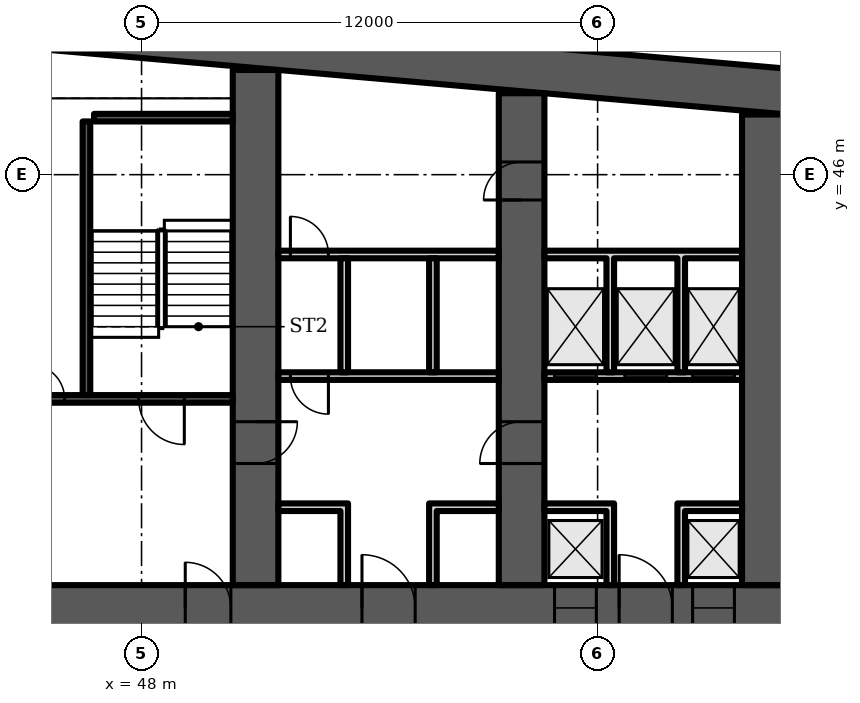
"""IFC4 building model, lengths in metres.
Left out: names, types, materials, properties, quantities, classifications, styles, units other than length and angle.
Written with IfcOpenShell. Run it as: python <this file> out.ifc"""

import sys

from ifc_helpers import new_model, si_unit, direction, frame, frame_2d, origin, place, context, subcontext, project, spatial, polyline, rectangle, outline, extrude, element, fill, save


model = new_model("IFC4")
c1 = context("Model", 3, precision=1e-05, world=origin(), true_north=direction((0.0, 1.0)))
c2 = subcontext(c1, "Body", "Model", "MODEL_VIEW")
j1 = project(units=[si_unit("LENGTHUNIT", "METRE"), si_unit("PLANEANGLEUNIT", "RADIAN")], contexts=[c1])
p1 = place(None, origin())
s1 = spatial("IfcSite", under=j1, at=p1, CompositionType="ELEMENT")
p2 = place(p1, origin())
s2 = spatial("IfcBuilding", under=s1, at=p2, CompositionType="ELEMENT")
p3 = place(p2, frame((0.0, 0.0, 77.5)))
s3 = spatial("IfcBuildingStorey", under=s2, at=p3, CompositionType="ELEMENT", Elevation=77.5)
p4 = place(p3, origin())
e1 = element("IfcWall", 1, at=p4, inside=s3, PredefinedType="SHEAR", context=c2, shape_type="SweptSolid", body=[
    extrude(outline(polyline([(9.0, 47.583), (37.0, 50.032), (65.0, 47.583), (65.0, 48.787), (37.0, 51.237), (9.0, 48.787), (9.0, 47.583)])), origin(), (0.0, 0.0, 1.0), 3.6),
])
p5 = place(p3, frame((9.0, 34.6, 0.0), z_axis=(0.0, 0.0, 1.0), x_axis=(1.0, 0.0, 0.0)))
e2 = element("IfcWall", 2, at=p5, inside=s3, PredefinedType="SHEAR", context=c2, shape_type="SweptSolid", body=[
    extrude(rectangle(XDim=56.0, YDim=1.2, at=frame_2d((28.0, 0.0))), origin(), (0.0, 0.0, 1.0), 3.6),
])
p6 = place(p5, frame((3.3, 0.0, 0.0)))
e3 = element("IfcOpeningElement", 3, at=p6, cuts=e2, PredefinedType="OPENING", context=c2, shape_type="SweptSolid", body=[
    extrude(rectangle(XDim=1.0, YDim=2.1, at=frame_2d((0.5, 1.05))), frame((0.0, 0.61, 0.0), z_axis=(0.0, -1.0, 0.0), x_axis=(1.0, 0.0, 0.0)), (0.0, 0.0, 1.0), 1.22),
])
p7 = place(p5, frame((7.867, 0.0, 0.0)))
e4 = element("IfcOpeningElement", 4, at=p7, cuts=e2, PredefinedType="OPENING", context=c2, shape_type="SweptSolid", body=[
    extrude(rectangle(XDim=1.1, YDim=2.1, at=frame_2d((0.55, 1.05))), frame((0.0, 0.61, 0.0), z_axis=(0.0, -1.0, 0.0), x_axis=(1.0, 0.0, 0.0)), (0.0, 0.0, 1.0), 1.22),
])
p8 = place(p5, frame((12.033, 0.0, 0.0)))
e5 = element("IfcOpeningElement", 5, at=p8, cuts=e2, PredefinedType="OPENING", context=c2, shape_type="SweptSolid", body=[
    extrude(rectangle(XDim=1.1, YDim=2.1, at=frame_2d((0.55, 1.05))), frame((0.0, 0.61, 0.0), z_axis=(0.0, -1.0, 0.0), x_axis=(1.0, 0.0, 0.0)), (0.0, 0.0, 1.0), 1.22),
])
p9 = place(p5, frame((9.8, 0.0, 0.0)))
e6 = element("IfcOpeningElement", 6, at=p9, cuts=e2, PredefinedType="OPENING", context=c2, shape_type="SweptSolid", body=[
    extrude(rectangle(XDim=1.4, YDim=2.1, at=frame_2d((0.7, 1.05))), frame((0.0, 0.61, 0.0), z_axis=(0.0, -1.0, 0.0), x_axis=(1.0, 0.0, 0.0)), (0.0, 0.0, 1.0), 1.22),
])
p10 = place(p5, frame((14.65, 0.0, 0.0)))
e7 = element("IfcOpeningElement", 7, at=p10, cuts=e2, PredefinedType="OPENING", context=c2, shape_type="SweptSolid", body=[
    extrude(rectangle(XDim=1.2, YDim=2.1, at=frame_2d((0.6, 1.05))), frame((0.0, 0.61, 0.0), z_axis=(0.0, -1.0, 0.0), x_axis=(1.0, 0.0, 0.0)), (0.0, 0.0, 1.0), 1.22),
])
p11 = place(p5, frame((21.867, 0.0, 0.0)))
e8 = element("IfcOpeningElement", 8, at=p11, cuts=e2, PredefinedType="OPENING", context=c2, shape_type="SweptSolid", body=[
    extrude(rectangle(XDim=1.1, YDim=2.1, at=frame_2d((0.55, 1.05))), frame((0.0, 0.61, 0.0), z_axis=(0.0, -1.0, 0.0), x_axis=(1.0, 0.0, 0.0)), (0.0, 0.0, 1.0), 1.22),
])
p12 = place(p5, frame((26.033, 0.0, 0.0)))
e9 = element("IfcOpeningElement", 9, at=p12, cuts=e2, PredefinedType="OPENING", context=c2, shape_type="SweptSolid", body=[
    extrude(rectangle(XDim=1.1, YDim=2.1, at=frame_2d((0.55, 1.05))), frame((0.0, 0.61, 0.0), z_axis=(0.0, -1.0, 0.0), x_axis=(1.0, 0.0, 0.0)), (0.0, 0.0, 1.0), 1.22),
])
p13 = place(p5, frame((23.8, 0.0, 0.0)))
e10 = element("IfcOpeningElement", 10, at=p13, cuts=e2, PredefinedType="OPENING", context=c2, shape_type="SweptSolid", body=[
    extrude(rectangle(XDim=1.4, YDim=2.1, at=frame_2d((0.7, 1.05))), frame((0.0, 0.61, 0.0), z_axis=(0.0, -1.0, 0.0), x_axis=(1.0, 0.0, 0.0)), (0.0, 0.0, 1.0), 1.22),
])
p14 = place(p5, frame((28.867, 0.0, 0.0)))
e11 = element("IfcOpeningElement", 11, at=p14, cuts=e2, PredefinedType="OPENING", context=c2, shape_type="SweptSolid", body=[
    extrude(rectangle(XDim=1.1, YDim=2.1, at=frame_2d((0.55, 1.05))), frame((0.0, 0.61, 0.0), z_axis=(0.0, -1.0, 0.0), x_axis=(1.0, 0.0, 0.0)), (0.0, 0.0, 1.0), 1.22),
])
p15 = place(p5, frame((33.033, 0.0, 0.0)))
e12 = element("IfcOpeningElement", 12, at=p15, cuts=e2, PredefinedType="OPENING", context=c2, shape_type="SweptSolid", body=[
    extrude(rectangle(XDim=1.1, YDim=2.1, at=frame_2d((0.55, 1.05))), frame((0.0, 0.61, 0.0), z_axis=(0.0, -1.0, 0.0), x_axis=(1.0, 0.0, 0.0)), (0.0, 0.0, 1.0), 1.22),
])
p16 = place(p5, frame((40.15, 0.0, 0.0)))
e13 = element("IfcOpeningElement", 13, at=p16, cuts=e2, PredefinedType="OPENING", context=c2, shape_type="SweptSolid", body=[
    extrude(rectangle(XDim=1.2, YDim=2.1, at=frame_2d((0.6, 1.05))), frame((0.0, 0.61, 0.0), z_axis=(0.0, -1.0, 0.0), x_axis=(1.0, 0.0, 0.0)), (0.0, 0.0, 1.0), 1.22),
])
p17 = place(p5, frame((44.8, 0.0, 0.0)))
e14 = element("IfcOpeningElement", 14, at=p17, cuts=e2, PredefinedType="OPENING", context=c2, shape_type="SweptSolid", body=[
    extrude(rectangle(XDim=1.4, YDim=2.1, at=frame_2d((0.7, 1.05))), frame((0.0, 0.61, 0.0), z_axis=(0.0, -1.0, 0.0), x_axis=(1.0, 0.0, 0.0)), (0.0, 0.0, 1.0), 1.22),
])
p18 = place(p5, frame((49.867, 0.0, 0.0)))
e15 = element("IfcOpeningElement", 15, at=p18, cuts=e2, PredefinedType="OPENING", context=c2, shape_type="SweptSolid", body=[
    extrude(rectangle(XDim=1.1, YDim=2.1, at=frame_2d((0.55, 1.05))), frame((0.0, 0.61, 0.0), z_axis=(0.0, -1.0, 0.0), x_axis=(1.0, 0.0, 0.0)), (0.0, 0.0, 1.0), 1.22),
])
p19 = place(p5, frame((53.5, 0.0, 0.0)))
e16 = element("IfcOpeningElement", 16, at=p19, cuts=e2, PredefinedType="OPENING", context=c2, shape_type="SweptSolid", body=[
    extrude(rectangle(XDim=1.1, YDim=2.1, at=frame_2d((0.55, 1.05))), frame((0.0, 0.61, 0.0), z_axis=(0.0, -1.0, 0.0), x_axis=(1.0, 0.0, 0.0)), (0.0, 0.0, 1.0), 1.22),
])
p20 = place(p5, frame((51.567, 0.0, 0.0)))
e17 = element("IfcOpeningElement", 17, at=p20, cuts=e2, PredefinedType="OPENING", context=c2, shape_type="SweptSolid", body=[
    extrude(rectangle(XDim=1.4, YDim=2.1, at=frame_2d((0.7, 1.05))), frame((0.0, 0.61, 0.0), z_axis=(0.0, -1.0, 0.0), x_axis=(1.0, 0.0, 0.0)), (0.0, 0.0, 1.0), 1.22),
])
p21 = place(p3, frame((51.0, 35.2, 0.0), z_axis=(0.0, 0.0, 1.0), x_axis=(0.0, 1.0, 0.0)))
e18 = element("IfcWall", 18, at=p21, inside=s3, PredefinedType="SHEAR", context=c2, shape_type="SweptSolid", body=[
    extrude(rectangle(XDim=13.555, YDim=1.2, at=frame_2d((6.778, 0.0))), origin(), (0.0, 0.0, 1.0), 3.6),
])
p22 = place(p21, frame((3.2, 0.0, 0.0)))
e19 = element("IfcOpeningElement", 19, at=p22, cuts=e18, PredefinedType="OPENING", context=c2, shape_type="SweptSolid", body=[
    extrude(rectangle(XDim=1.1, YDim=2.1, at=frame_2d((0.55, 1.05))), frame((0.0, 0.61, 0.0), z_axis=(0.0, -1.0, 0.0), x_axis=(1.0, 0.0, 0.0)), (0.0, 0.0, 1.0), 1.22),
])
p23 = place(p3, frame((58.0, 35.2, 0.0), z_axis=(0.0, 0.0, 1.0), x_axis=(0.0, 1.0, 0.0)))
e20 = element("IfcWall", 20, at=p23, inside=s3, PredefinedType="SHEAR", context=c2, shape_type="SweptSolid", body=[
    extrude(rectangle(XDim=12.943, YDim=1.2, at=frame_2d((6.471, 0.0))), origin(), (0.0, 0.0, 1.0), 3.6),
])
p24 = place(p23, frame((10.134, 0.0, 0.0)))
e21 = element("IfcOpeningElement", 21, at=p24, cuts=e20, PredefinedType="OPENING", context=c2, shape_type="SweptSolid", body=[
    extrude(rectangle(XDim=1.0, YDim=2.1, at=frame_2d((0.5, 1.05))), frame((0.0, 0.61, 0.0), z_axis=(0.0, -1.0, 0.0), x_axis=(1.0, 0.0, 0.0)), (0.0, 0.0, 1.0), 1.22),
])
p25 = place(p23, frame((3.2, 0.0, 0.0)))
e22 = element("IfcOpeningElement", 22, at=p25, cuts=e20, PredefinedType="OPENING", context=c2, shape_type="SweptSolid", body=[
    extrude(rectangle(XDim=1.1, YDim=2.1, at=frame_2d((0.55, 1.05))), frame((0.0, 0.61, 0.0), z_axis=(0.0, -1.0, 0.0), x_axis=(1.0, 0.0, 0.0)), (0.0, 0.0, 1.0), 1.22),
])
p26 = place(p3, frame((64.4, 35.2, 0.0), z_axis=(0.0, 0.0, 1.0), x_axis=(0.0, 1.0, 0.0)))
e23 = element("IfcWall", 23, at=p26, inside=s3, PredefinedType="SHEAR", context=c2, shape_type="SweptSolid", body=[
    extrude(rectangle(XDim=12.383, YDim=1.2, at=frame_2d((6.191, 0.0))), origin(), (0.0, 0.0, 1.0), 3.6),
])
p27 = place(p3, frame((44.6, 40.1, 0.0), z_axis=(0.0, 0.0, 1.0), x_axis=(1.0, 0.0, 0.0)))
e24 = element("IfcWall", 24, at=p27, inside=s3, PredefinedType="SHEAR", context=c2, shape_type="SweptSolid", body=[
    extrude(rectangle(XDim=5.8, YDim=0.2, at=frame_2d((2.9, 0.0))), origin(), (0.0, 0.0, 1.0), 3.2),
])
p28 = place(p27, frame((3.325, 0.0, 0.0)))
e25 = element("IfcOpeningElement", 25, at=p28, cuts=e24, PredefinedType="OPENING", context=c2, shape_type="SweptSolid", body=[
    extrude(rectangle(XDim=1.2, YDim=2.1, at=frame_2d((0.6, 1.05))), frame((0.0, 0.11, 0.0), z_axis=(0.0, -1.0, 0.0), x_axis=(1.0, 0.0, 0.0)), (0.0, 0.0, 1.0), 0.22),
])
p29 = place(p27, frame((0.475, 0.0, 0.0)))
e26 = element("IfcOpeningElement", 26, at=p29, cuts=e24, PredefinedType="OPENING", context=c2, shape_type="SweptSolid", body=[
    extrude(rectangle(XDim=0.9, YDim=2.1, at=frame_2d((0.45, 1.05))), frame((0.0, 0.11, 0.0), z_axis=(0.0, -1.0, 0.0), x_axis=(1.0, 0.0, 0.0)), (0.0, 0.0, 1.0), 0.22),
])
p30 = place(p3, frame((46.55, 40.2, 0.0), z_axis=(0.0, 0.0, 1.0), x_axis=(0.0, 1.0, 0.0)))
e27 = element("IfcWall", 27, at=p30, inside=s3, PredefinedType="SHEAR", context=c2, shape_type="SweptSolid", body=[
    extrude(rectangle(XDim=7.2, YDim=0.2, at=frame_2d((3.6, 0.0))), origin(), (0.0, 0.0, 1.0), 3.2),
])
p31 = place(p3, frame((46.75, 47.5, 0.0), z_axis=(0.0, 0.0, 1.0), x_axis=(1.0, 0.0, 0.0)))
e28 = element("IfcWall", 28, at=p31, inside=s3, PredefinedType="SHEAR", context=c2, shape_type="SweptSolid", body=[
    extrude(rectangle(XDim=3.65, YDim=0.2, at=frame_2d((1.825, 0.0))), origin(), (0.0, 0.0, 1.0), 3.2),
])
p32 = place(p3, frame((51.6, 40.7, 0.0), z_axis=(0.0, 0.0, 1.0), x_axis=(1.0, 0.0, 0.0)))
e29 = element("IfcWall", 29, at=p32, inside=s3, PredefinedType="PARTITIONING", context=c2, shape_type="SweptSolid", body=[
    extrude(rectangle(XDim=5.8, YDim=0.2, at=frame_2d((2.9, 0.0))), origin(), (0.0, 0.0, 1.0), 3.2),
])
p33 = place(p32, frame((0.317, 0.0, 0.0)))
e30 = element("IfcOpeningElement", 30, at=p33, cuts=e29, PredefinedType="OPENING", context=c2, shape_type="SweptSolid", body=[
    extrude(rectangle(XDim=1.0, YDim=2.1, at=frame_2d((0.5, 1.05))), frame((0.0, 0.11, 0.0), z_axis=(0.0, -1.0, 0.0), x_axis=(1.0, 0.0, 0.0)), (0.0, 0.0, 1.0), 0.22),
])
p34 = place(p3, frame((51.6, 43.9, 0.0), z_axis=(0.0, 0.0, 1.0), x_axis=(1.0, 0.0, 0.0)))
e31 = element("IfcWall", 31, at=p34, inside=s3, PredefinedType="PARTITIONING", context=c2, shape_type="SweptSolid", body=[
    extrude(rectangle(XDim=5.8, YDim=0.2, at=frame_2d((2.9, 0.0))), origin(), (0.0, 0.0, 1.0), 3.2),
])
p35 = place(p34, frame((0.317, 0.0, 0.0)))
e32 = element("IfcOpeningElement", 32, at=p35, cuts=e31, PredefinedType="OPENING", context=c2, shape_type="SweptSolid", body=[
    extrude(rectangle(XDim=1.0, YDim=2.1, at=frame_2d((0.5, 1.05))), frame((0.0, 0.11, 0.0), z_axis=(0.0, -1.0, 0.0), x_axis=(1.0, 0.0, 0.0)), (0.0, 0.0, 1.0), 0.22),
])
p36 = place(p3, frame((0.0, 0.0, -0.0)))
e33 = element("IfcWall", 33, at=p36, inside=s3, PredefinedType="PARTITIONING", context=c2, shape_type="SweptSolid", body=[
    extrude(outline(polyline([(53.233, 37.15), (51.6, 37.15), (51.6, 37.35), (53.233, 37.35), (53.433, 37.35), (53.433, 35.2), (53.233, 35.2), (53.233, 37.15)])), origin(), (0.0, 0.0, 1.0), 3.2),
])
p37 = place(p3, frame((0.0, 0.0, -0.0)))
e34 = element("IfcWall", 34, at=p37, inside=s3, PredefinedType="PARTITIONING", context=c2, shape_type="SweptSolid", body=[
    extrude(outline(polyline([(55.567, 37.35), (55.767, 37.35), (57.4, 37.35), (57.4, 37.15), (55.767, 37.15), (55.767, 35.2), (55.567, 35.2), (55.567, 37.35)])), origin(), (0.0, 0.0, 1.0), 3.2),
])
p38 = place(p3, frame((0.0, 0.0, -0.0)))
e35 = element("IfcWall", 35, at=p38, inside=s3, PredefinedType="PARTITIONING", context=c2, shape_type="SweptSolid", body=[
    extrude(outline(polyline([(53.233, 40.8), (53.233, 43.8), (53.433, 43.8), (53.433, 40.8), (53.233, 40.8)])), origin(), (0.0, 0.0, 1.0), 3.2),
])
p39 = place(p3, frame((0.0, 0.0, -0.0)))
e36 = element("IfcWall", 36, at=p39, inside=s3, PredefinedType="PARTITIONING", context=c2, shape_type="SweptSolid", body=[
    extrude(outline(polyline([(55.567, 40.8), (55.567, 43.8), (55.767, 43.8), (55.767, 40.8), (55.567, 40.8)])), origin(), (0.0, 0.0, 1.0), 3.2),
])
p40 = place(p3, frame((58.6, 40.7, 0.0), z_axis=(0.0, 0.0, 1.0), x_axis=(1.0, 0.0, 0.0)))
e37 = element("IfcWall", 37, at=p40, inside=s3, PredefinedType="PARTITIONING", context=c2, shape_type="SweptSolid", body=[
    extrude(rectangle(XDim=5.2, YDim=0.2, at=frame_2d((2.6, 0.0))), origin(), (0.0, 0.0, 1.0), 3.2),
])
p41 = place(p40, frame((0.267, 0.0, 0.0)))
e38 = element("IfcOpeningElement", 38, at=p41, cuts=e37, PredefinedType="OPENING", context=c2, shape_type="SweptSolid", body=[
    extrude(rectangle(XDim=1.1, YDim=2.1, at=frame_2d((0.55, 1.05))), frame((0.0, 0.11, 0.0), z_axis=(0.0, -1.0, 0.0), x_axis=(1.0, 0.0, 0.0)), (0.0, 0.0, 1.0), 0.22),
])
p42 = place(p40, frame((2.117, 0.0, 0.0)))
e39 = element("IfcOpeningElement", 39, at=p42, cuts=e37, PredefinedType="OPENING", context=c2, shape_type="SweptSolid", body=[
    extrude(rectangle(XDim=1.1, YDim=2.1, at=frame_2d((0.55, 1.05))), frame((0.0, 0.11, 0.0), z_axis=(0.0, -1.0, 0.0), x_axis=(1.0, 0.0, 0.0)), (0.0, 0.0, 1.0), 0.22),
])
p43 = place(p40, frame((3.9, 0.0, 0.0)))
e40 = element("IfcOpeningElement", 40, at=p43, cuts=e37, PredefinedType="OPENING", context=c2, shape_type="SweptSolid", body=[
    extrude(rectangle(XDim=1.1, YDim=2.1, at=frame_2d((0.55, 1.05))), frame((0.0, 0.11, 0.0), z_axis=(0.0, -1.0, 0.0), x_axis=(1.0, 0.0, 0.0)), (0.0, 0.0, 1.0), 0.22),
])
p44 = place(p3, frame((0.0, 0.0, -0.0)))
e41 = element("IfcWall", 41, at=p44, inside=s3, PredefinedType="PARTITIONING", context=c2, shape_type="SweptSolid", body=[
    extrude(outline(polyline([(60.233, 37.15), (58.6, 37.15), (58.6, 37.35), (60.233, 37.35), (60.433, 37.35), (60.433, 35.2), (60.233, 35.2), (60.233, 37.15)])), origin(), (0.0, 0.0, 1.0), 3.2),
])
p45 = place(p3, frame((0.0, 0.0, -0.0)))
e42 = element("IfcWall", 42, at=p45, inside=s3, PredefinedType="PARTITIONING", context=c2, shape_type="SweptSolid", body=[
    extrude(outline(polyline([(62.1, 37.35), (62.3, 37.35), (63.8, 37.35), (63.8, 37.15), (62.3, 37.15), (62.3, 35.2), (62.1, 35.2), (62.1, 37.35)])), origin(), (0.0, 0.0, 1.0), 3.2),
])
p46 = place(p3, frame((0.0, 0.0, -0.0)))
e43 = element("IfcWall", 43, at=p46, inside=s3, PredefinedType="PARTITIONING", context=c2, shape_type="SweptSolid", body=[
    extrude(outline(polyline([(60.433, 40.8), (60.233, 40.8), (60.233, 43.8), (58.6, 43.8), (58.6, 44.0), (63.8, 44.0), (63.8, 43.8), (62.3, 43.8), (62.3, 40.8), (62.1, 40.8), (62.1, 43.8), (60.433, 43.8), (60.433, 40.8)])), origin(), (0.0, 0.0, 1.0), 3.2),
])
p47 = place(p28, origin())
e44 = element("IfcDoor", 44, at=p47, inside=s3, OperationType="SINGLE_SWING_RIGHT", PredefinedType="DOOR", context=c2, shape_type="SweptSolid", body=[
    extrude(rectangle(XDim=1.2, YDim=2.1, at=frame_2d((0.6, 1.05))), frame((0.0, 0.025, 0.0), z_axis=(0.0, -1.0, 0.0), x_axis=(1.0, 0.0, 0.0)), (0.0, 0.0, 1.0), 0.05),
])
fill(e25, e44)
p48 = place(p29, origin())
e45 = element("IfcDoor", 45, at=p48, inside=s3, OperationType="SINGLE_SWING_LEFT", PredefinedType="DOOR", context=c2, shape_type="SweptSolid", body=[
    extrude(rectangle(XDim=0.9, YDim=2.1, at=frame_2d((0.45, 1.05))), frame((0.0, 0.025, 0.0), z_axis=(0.0, -1.0, 0.0), x_axis=(1.0, 0.0, 0.0)), (0.0, 0.0, 1.0), 0.05),
])
fill(e26, e45)
p49 = place(p16, origin())
e46 = element("IfcDoor", 46, at=p49, inside=s3, OperationType="SINGLE_SWING_LEFT", PredefinedType="DOOR", context=c2, shape_type="SweptSolid", body=[
    extrude(rectangle(XDim=1.2, YDim=2.1, at=frame_2d((0.6, 1.05))), frame((0.0, 0.025, 0.0), z_axis=(0.0, -1.0, 0.0), x_axis=(1.0, 0.0, 0.0)), (0.0, 0.0, 1.0), 0.05),
])
fill(e13, e46)
p50 = place(p17, origin())
e47 = element("IfcDoor", 47, at=p50, inside=s3, OperationType="DOUBLE_DOOR_SINGLE_SWING", PredefinedType="DOOR", context=c2, shape_type="SweptSolid", body=[
    extrude(rectangle(XDim=1.4, YDim=2.1, at=frame_2d((0.7, 1.05))), frame((0.0, 0.025, 0.0), z_axis=(0.0, -1.0, 0.0), x_axis=(1.0, 0.0, 0.0)), (0.0, 0.0, 1.0), 0.05),
])
fill(e14, e47)
p51 = place(p33, origin())
e48 = element("IfcDoor", 48, at=p51, inside=s3, OperationType="SINGLE_SWING_RIGHT", PredefinedType="DOOR", context=c2, shape_type="SweptSolid", body=[
    extrude(rectangle(XDim=1.0, YDim=2.1, at=frame_2d((0.5, 1.05))), frame((0.0, 0.025, 0.0), z_axis=(0.0, -1.0, 0.0), x_axis=(1.0, 0.0, 0.0)), (0.0, 0.0, 1.0), 0.05),
])
fill(e30, e48)
p52 = place(p35, origin())
e49 = element("IfcDoor", 49, at=p52, inside=s3, OperationType="SINGLE_SWING_LEFT", PredefinedType="DOOR", context=c2, shape_type="SweptSolid", body=[
    extrude(rectangle(XDim=1.0, YDim=2.1, at=frame_2d((0.5, 1.05))), frame((0.0, 0.025, 0.0), z_axis=(0.0, -1.0, 0.0), x_axis=(1.0, 0.0, 0.0)), (0.0, 0.0, 1.0), 0.05),
])
fill(e32, e49)
p53 = place(p18, origin())
e50 = element("IfcDoor", 50, at=p53, inside=s3, OperationType="DOUBLE_DOOR_SLIDING", PredefinedType="DOOR", context=c2, shape_type="SweptSolid", body=[
    extrude(rectangle(XDim=1.1, YDim=2.1, at=frame_2d((0.55, 1.05))), frame((0.0, 0.025, 0.0), z_axis=(0.0, -1.0, 0.0), x_axis=(1.0, 0.0, 0.0)), (0.0, 0.0, 1.0), 0.05),
])
fill(e15, e50)
p54 = place(p19, origin())
e51 = element("IfcDoor", 51, at=p54, inside=s3, OperationType="DOUBLE_DOOR_SLIDING", PredefinedType="DOOR", context=c2, shape_type="SweptSolid", body=[
    extrude(rectangle(XDim=1.1, YDim=2.1, at=frame_2d((0.55, 1.05))), frame((0.0, 0.025, 0.0), z_axis=(0.0, -1.0, 0.0), x_axis=(1.0, 0.0, 0.0)), (0.0, 0.0, 1.0), 0.05),
])
fill(e16, e51)
p55 = place(p20, origin())
e52 = element("IfcDoor", 52, at=p55, inside=s3, OperationType="DOUBLE_DOOR_SINGLE_SWING", PredefinedType="DOOR", context=c2, shape_type="SweptSolid", body=[
    extrude(rectangle(XDim=1.4, YDim=2.1, at=frame_2d((0.7, 1.05))), frame((0.0, 0.025, 0.0), z_axis=(0.0, -1.0, 0.0), x_axis=(1.0, 0.0, 0.0)), (0.0, 0.0, 1.0), 0.05),
])
fill(e17, e52)
p56 = place(p41, origin())
e53 = element("IfcDoor", 53, at=p56, inside=s3, OperationType="DOUBLE_DOOR_SLIDING", PredefinedType="DOOR", context=c2, shape_type="SweptSolid", body=[
    extrude(rectangle(XDim=1.1, YDim=2.1, at=frame_2d((0.55, 1.05))), frame((0.0, 0.025, 0.0), z_axis=(0.0, -1.0, 0.0), x_axis=(1.0, 0.0, 0.0)), (0.0, 0.0, 1.0), 0.05),
])
fill(e38, e53)
p57 = place(p42, origin())
e54 = element("IfcDoor", 54, at=p57, inside=s3, OperationType="DOUBLE_DOOR_SLIDING", PredefinedType="DOOR", context=c2, shape_type="SweptSolid", body=[
    extrude(rectangle(XDim=1.1, YDim=2.1, at=frame_2d((0.55, 1.05))), frame((0.0, 0.025, 0.0), z_axis=(0.0, -1.0, 0.0), x_axis=(1.0, 0.0, 0.0)), (0.0, 0.0, 1.0), 0.05),
])
fill(e39, e54)
p58 = place(p43, origin())
e55 = element("IfcDoor", 55, at=p58, inside=s3, OperationType="DOUBLE_DOOR_SLIDING", PredefinedType="DOOR", context=c2, shape_type="SweptSolid", body=[
    extrude(rectangle(XDim=1.1, YDim=2.1, at=frame_2d((0.55, 1.05))), frame((0.0, 0.025, 0.0), z_axis=(0.0, -1.0, 0.0), x_axis=(1.0, 0.0, 0.0)), (0.0, 0.0, 1.0), 0.05),
])
fill(e40, e55)
p59 = place(p24, origin())
e56 = element("IfcDoor", 56, at=p59, inside=s3, OperationType="SINGLE_SWING_LEFT", PredefinedType="DOOR", context=c2, shape_type="SweptSolid", body=[
    extrude(rectangle(XDim=1.0, YDim=2.1, at=frame_2d((0.5, 1.05))), frame((0.0, 0.6, 0.0), z_axis=(0.0, -1.0, 0.0), x_axis=(1.0, 0.0, 0.0)), (0.0, 0.0, 1.0), 1.199),
])
fill(e21, e56)
p60 = place(p22, origin())
e57 = element("IfcDoor", 57, at=p60, inside=s3, OperationType="SINGLE_SWING_RIGHT", PredefinedType="DOOR", context=c2, shape_type="SweptSolid", body=[
    extrude(rectangle(XDim=1.1, YDim=2.1, at=frame_2d((0.55, 1.05))), frame((0.0, 0.025, 0.0), z_axis=(0.0, -1.0, 0.0), x_axis=(1.0, 0.0, 0.0)), (0.0, 0.0, 1.0), 0.05),
])
fill(e19, e57)
p61 = place(p25, origin())
e58 = element("IfcDoor", 58, at=p61, inside=s3, OperationType="SINGLE_SWING_LEFT", PredefinedType="DOOR", context=c2, shape_type="SweptSolid", body=[
    extrude(rectangle(XDim=1.1, YDim=2.1, at=frame_2d((0.55, 1.05))), frame((0.0, 0.025, 0.0), z_axis=(0.0, -1.0, 0.0), x_axis=(1.0, 0.0, 0.0)), (0.0, 0.0, 1.0), 0.05),
])
fill(e22, e58)
save(model, sys.argv[1])
